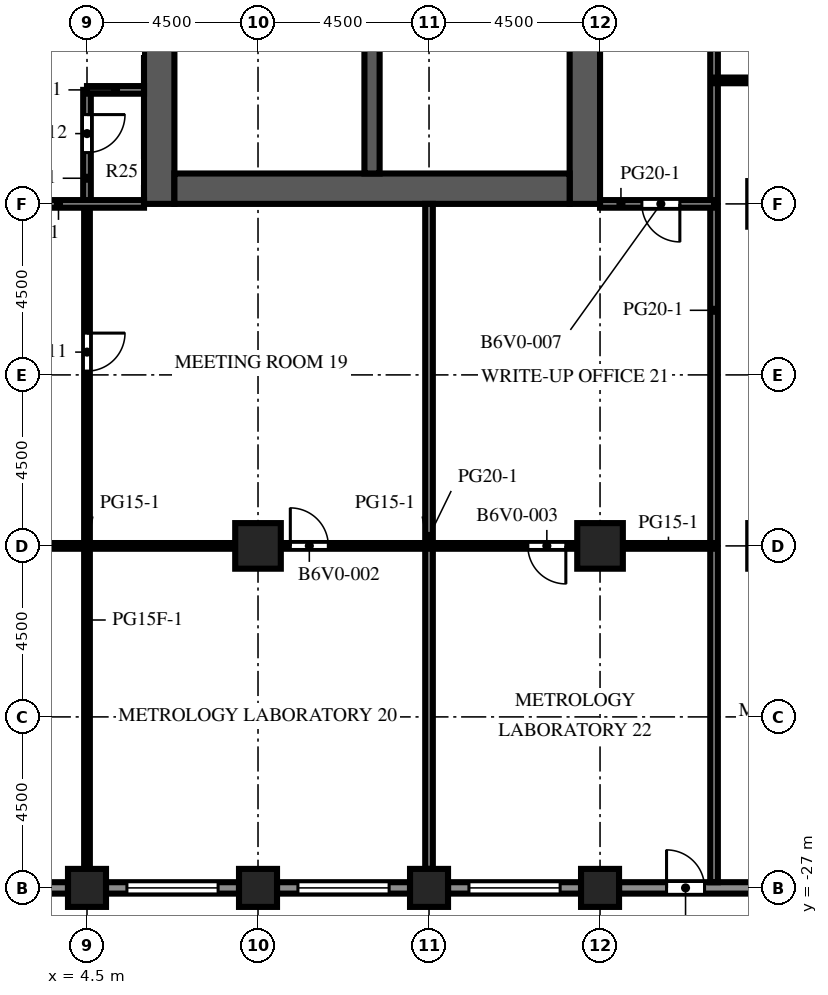
"""IFC4 building model, lengths in metres.
Left out: names, types, materials, properties, quantities, classifications, styles, units other than length and angle.
Written with IfcOpenShell. Run it as: python <this file> out.ifc"""

import sys

from ifc_helpers import new_model, si_unit, direction, frame, frame_2d, origin, origin_2d, place, context, subcontext, project, spatial, rectangle, extrude, element, fill, save


model = new_model("IFC4")
c1 = context("Model", 3, precision=1e-05, world=origin(), true_north=direction((0.0, 1.0)))
c2 = subcontext(c1, "Body", "Model", "MODEL_VIEW")
j1 = project(units=[si_unit("LENGTHUNIT", "METRE"), si_unit("PLANEANGLEUNIT", "RADIAN")], contexts=[c1])
p1 = place(None, origin())
s1 = spatial("IfcSite", under=j1, at=p1, CompositionType="ELEMENT")
p2 = place(p1, origin())
s2 = spatial("IfcBuilding", under=s1, at=p2, CompositionType="ELEMENT")
p3 = place(p2, frame((0.0, 0.0, 199.7)))
s3 = spatial("IfcBuildingStorey", under=s2, at=p3, CompositionType="ELEMENT", Elevation=199.7)
for number, where, z_axis, x_axis in (
    (1, (4.5, -27.0, 0.0), (0.0, 0.0, 1.0), (1.0, 0.0, 0.0)),
    (2, (9.0, -27.0, 0.0), (0.0, 0.0, 1.0), (1.0, 0.0, 0.0)),
    (3, (13.5, -27.0, 0.0), (0.0, 0.0, 1.0), (1.0, 0.0, 0.0)),
    (4, (18.0, -27.0, 0.0), (0.0, 0.0, 1.0), (1.0, 0.0, 0.0)),
):
    element("IfcColumn", number, at=place(p3, frame(where, z_axis=z_axis, x_axis=x_axis)), inside=s3, PredefinedType="COLUMN", context=c2, shape_type="SweptSolid", body=[
        extrude(rectangle(XDim=1.0, YDim=1.0, at=origin_2d()), origin(), (0.0, 0.0, 1.0), 4.1),
    ])
for number, where, z_axis, x_axis in (
    (5, (9.0, -18.0, 0.0), (0.0, 0.0, 1.0), (1.0, 0.0, 0.0)),
    (6, (18.0, -18.0, 0.0), (0.0, 0.0, 1.0), (1.0, 0.0, 0.0)),
):
    element("IfcColumn", number, at=place(p3, frame(where, z_axis=z_axis, x_axis=x_axis)), inside=s3, PredefinedType="COLUMN", context=c2, shape_type="SweptSolid", body=[
        extrude(rectangle(XDim=1.2, YDim=1.2, at=origin_2d()), origin(), (0.0, 0.0, 1.0), 4.1),
    ])
p4 = place(p3, frame((6.4, -9.0, 0.0), z_axis=(0.0, 0.0, 1.0), x_axis=(0.0, 1.0, 0.0)))
e7 = element("IfcWall", 7, at=p4, inside=s3, PredefinedType="SHEAR", context=c2, shape_type="SweptSolid", body=[
    extrude(rectangle(XDim=27.5, YDim=0.8, at=frame_2d((13.75, 0.0))), origin(), (0.0, 0.0, 1.0), 4.1),
])
p5 = place(p4, frame((12.55, 0.0, 0.0)))
e8 = element("IfcOpeningElement", 8, at=p5, cuts=e7, PredefinedType="OPENING", context=c2, shape_type="SweptSolid", body=[
    extrude(rectangle(XDim=2.4, YDim=2.4, at=frame_2d((1.2, 1.2))), frame((0.0, 0.41, 0.0), z_axis=(0.0, -1.0, 0.0), x_axis=(1.0, 0.0, 0.0)), (0.0, 0.0, 1.0), 0.82),
])
p6 = place(p4, frame((3.95, 0.0, 0.0)))
e9 = element("IfcOpeningElement", 9, at=p6, cuts=e7, PredefinedType="OPENING", context=c2, shape_type="SweptSolid", body=[
    extrude(rectangle(XDim=1.2, YDim=2.1, at=frame_2d((0.6, 1.05))), frame((0.0, 0.41, 0.0), z_axis=(0.0, -1.0, 0.0), x_axis=(1.0, 0.0, 0.0)), (0.0, 0.0, 1.0), 0.82),
])
p7 = place(p4, frame((19.45, 0.0, 0.0)))
e10 = element("IfcOpeningElement", 10, at=p7, cuts=e7, PredefinedType="OPENING", context=c2, shape_type="SweptSolid", body=[
    extrude(rectangle(XDim=1.0, YDim=2.1, at=frame_2d((0.5, 1.05))), frame((0.0, 0.41, 0.0), z_axis=(0.0, -1.0, 0.0), x_axis=(1.0, 0.0, 0.0)), (0.0, 0.0, 1.0), 0.82),
])
p8 = place(p4, frame((21.137, 0.0, 0.0)))
e11 = element("IfcOpeningElement", 11, at=p8, cuts=e7, PredefinedType="OPENING", context=c2, shape_type="SweptSolid", body=[
    extrude(rectangle(XDim=1.0, YDim=2.1, at=frame_2d((0.5, 1.05))), frame((0.0, 0.41, 0.0), z_axis=(0.0, -1.0, 0.0), x_axis=(1.0, 0.0, 0.0)), (0.0, 0.0, 1.0), 0.82),
])
p9 = place(p4, frame((23.2, 0.0, 0.0)))
e12 = element("IfcOpeningElement", 12, at=p9, cuts=e7, PredefinedType="OPENING", context=c2, shape_type="SweptSolid", body=[
    extrude(rectangle(XDim=1.0, YDim=2.1, at=frame_2d((0.5, 1.05))), frame((0.0, 0.41, 0.0), z_axis=(0.0, -1.0, 0.0), x_axis=(1.0, 0.0, 0.0)), (0.0, 0.0, 1.0), 0.82),
])
p10 = place(p4, frame((25.262, 0.0, 0.0)))
e13 = element("IfcOpeningElement", 13, at=p10, cuts=e7, PredefinedType="OPENING", context=c2, shape_type="SweptSolid", body=[
    extrude(rectangle(XDim=1.0, YDim=2.1, at=frame_2d((0.5, 1.05))), frame((0.0, 0.41, 0.0), z_axis=(0.0, -1.0, 0.0), x_axis=(1.0, 0.0, 0.0)), (0.0, 0.0, 1.0), 0.82),
])
p11 = place(p3, frame((17.6, -9.0, 0.0), z_axis=(0.0, 0.0, 1.0), x_axis=(0.0, 1.0, 0.0)))
e14 = element("IfcWall", 14, at=p11, inside=s3, PredefinedType="SHEAR", context=c2, shape_type="SweptSolid", body=[
    extrude(rectangle(XDim=27.5, YDim=0.8, at=frame_2d((13.75, 0.0))), origin(), (0.0, 0.0, 1.0), 4.1),
])
p12 = place(p11, frame((12.55, 0.0, 0.0)))
e15 = element("IfcOpeningElement", 15, at=p12, cuts=e14, PredefinedType="OPENING", context=c2, shape_type="SweptSolid", body=[
    extrude(rectangle(XDim=2.4, YDim=2.4, at=frame_2d((1.2, 1.2))), frame((0.0, 0.41, 0.0), z_axis=(0.0, -1.0, 0.0), x_axis=(1.0, 0.0, 0.0)), (0.0, 0.0, 1.0), 0.82),
])
p13 = place(p11, frame((6.825, 0.0, 0.0)))
e16 = element("IfcOpeningElement", 16, at=p13, cuts=e14, PredefinedType="OPENING", context=c2, shape_type="SweptSolid", body=[
    extrude(rectangle(XDim=1.2, YDim=2.1, at=frame_2d((0.6, 1.05))), frame((0.0, 0.41, 0.0), z_axis=(0.0, -1.0, 0.0), x_axis=(1.0, 0.0, 0.0)), (0.0, 0.0, 1.0), 0.82),
])
p14 = place(p11, frame((19.475, 0.0, 0.0)))
e17 = element("IfcOpeningElement", 17, at=p14, cuts=e14, PredefinedType="OPENING", context=c2, shape_type="SweptSolid", body=[
    extrude(rectangle(XDim=1.2, YDim=2.1, at=frame_2d((0.6, 1.05))), frame((0.0, 0.41, 0.0), z_axis=(0.0, -1.0, 0.0), x_axis=(1.0, 0.0, 0.0)), (0.0, 0.0, 1.0), 0.82),
])
p15 = place(p3, frame((6.8, -8.6, 0.0), z_axis=(0.0, 0.0, 1.0), x_axis=(1.0, 0.0, 0.0)))
e18 = element("IfcWall", 18, at=p15, inside=s3, PredefinedType="SHEAR", context=c2, shape_type="SweptSolid", body=[
    extrude(rectangle(XDim=10.4, YDim=0.8, at=frame_2d((5.2, 0.0))), origin(), (0.0, 0.0, 1.0), 4.1),
])
p16 = place(p3, frame((12.0, -8.2, 0.0), z_axis=(0.0, 0.0, 1.0), x_axis=(0.0, 1.0, 0.0)))
e19 = element("IfcWall", 19, at=p16, inside=s3, PredefinedType="SHEAR", context=c2, shape_type="SweptSolid", body=[
    extrude(rectangle(XDim=7.5, YDim=0.4, at=frame_2d((3.75, 0.0))), origin(), (0.0, 0.0, 1.0), 4.1),
])
p17 = place(p3, frame((4.0, -27.0, 0.0), z_axis=(0.0, 0.0, 1.0), x_axis=(-1.0, 0.0, 0.0)))
e20 = element("IfcWall", 20, at=p17, inside=s3, PredefinedType="SOLIDWALL", context=c2, shape_type="SweptSolid", body=[
    extrude(rectangle(XDim=3.5, YDim=0.3, at=frame_2d((1.75, 0.0))), origin(), (0.0, 0.0, 1.0), 2.85),
])
p18 = place(p17, frame((0.55, 0.0, 0.8)))
e21 = element("IfcOpeningElement", 21, at=p18, cuts=e20, PredefinedType="OPENING", context=c2, shape_type="SweptSolid", body=[
    extrude(rectangle(XDim=2.4, YDim=1.7, at=frame_2d((1.2, 0.85))), frame((0.0, 0.16, 0.0), z_axis=(0.0, -1.0, 0.0), x_axis=(1.0, 0.0, 0.0)), (0.0, 0.0, 1.0), 0.32),
])
p19 = place(p3, frame((8.5, -27.0, 0.0), z_axis=(0.0, 0.0, 1.0), x_axis=(-1.0, 0.0, 0.0)))
e22 = element("IfcWall", 22, at=p19, inside=s3, PredefinedType="SOLIDWALL", context=c2, shape_type="SweptSolid", body=[
    extrude(rectangle(XDim=3.5, YDim=0.3, at=frame_2d((1.75, 0.0))), origin(), (0.0, 0.0, 1.0), 2.85),
])
p20 = place(p19, frame((0.55, 0.0, 0.8)))
e23 = element("IfcOpeningElement", 23, at=p20, cuts=e22, PredefinedType="OPENING", context=c2, shape_type="SweptSolid", body=[
    extrude(rectangle(XDim=2.4, YDim=1.7, at=frame_2d((1.2, 0.85))), frame((0.0, 0.16, 0.0), z_axis=(0.0, -1.0, 0.0), x_axis=(1.0, 0.0, 0.0)), (0.0, 0.0, 1.0), 0.32),
])
p21 = place(p3, frame((13.0, -27.0, 0.0), z_axis=(0.0, 0.0, 1.0), x_axis=(-1.0, 0.0, 0.0)))
e24 = element("IfcWall", 24, at=p21, inside=s3, PredefinedType="SOLIDWALL", context=c2, shape_type="SweptSolid", body=[
    extrude(rectangle(XDim=3.5, YDim=0.3, at=frame_2d((1.75, 0.0))), origin(), (0.0, 0.0, 1.0), 2.85),
])
p22 = place(p21, frame((0.55, 0.0, 0.8)))
e25 = element("IfcOpeningElement", 25, at=p22, cuts=e24, PredefinedType="OPENING", context=c2, shape_type="SweptSolid", body=[
    extrude(rectangle(XDim=2.4, YDim=1.7, at=frame_2d((1.2, 0.85))), frame((0.0, 0.16, 0.0), z_axis=(0.0, -1.0, 0.0), x_axis=(1.0, 0.0, 0.0)), (0.0, 0.0, 1.0), 0.32),
])
p23 = place(p3, frame((17.5, -27.0, 0.0), z_axis=(0.0, 0.0, 1.0), x_axis=(-1.0, 0.0, 0.0)))
e26 = element("IfcWall", 26, at=p23, inside=s3, PredefinedType="SOLIDWALL", context=c2, shape_type="SweptSolid", body=[
    extrude(rectangle(XDim=3.5, YDim=0.3, at=frame_2d((1.75, 0.0))), origin(), (0.0, 0.0, 1.0), 2.85),
])
p24 = place(p23, frame((0.55, 0.0, 0.8)))
e27 = element("IfcOpeningElement", 27, at=p24, cuts=e26, PredefinedType="OPENING", context=c2, shape_type="SweptSolid", body=[
    extrude(rectangle(XDim=2.4, YDim=1.7, at=frame_2d((1.2, 0.85))), frame((0.0, 0.16, 0.0), z_axis=(0.0, -1.0, 0.0), x_axis=(1.0, 0.0, 0.0)), (0.0, 0.0, 1.0), 0.32),
])
p25 = place(p3, frame((22.0, -27.0, 0.0), z_axis=(0.0, 0.0, 1.0), x_axis=(-1.0, 0.0, 0.0)))
e28 = element("IfcWall", 28, at=p25, inside=s3, PredefinedType="SOLIDWALL", context=c2, shape_type="SweptSolid", body=[
    extrude(rectangle(XDim=3.5, YDim=0.3, at=frame_2d((1.75, 0.0))), origin(), (0.0, 0.0, 1.0), 2.85),
])
p26 = place(p25, frame((1.25, 0.0, 0.0)))
e29 = element("IfcOpeningElement", 29, at=p26, cuts=e28, PredefinedType="OPENING", context=c2, shape_type="SweptSolid", body=[
    extrude(rectangle(XDim=1.0, YDim=2.2, at=frame_2d((0.5, 1.1))), frame((0.0, 0.16, 0.0), z_axis=(0.0, -1.0, 0.0), x_axis=(1.0, 0.0, 0.0)), (0.0, 0.0, 1.0), 0.32),
])
p27 = place(p3, frame((6.8, -5.95, 0.0), z_axis=(0.0, 0.0, 1.0), x_axis=(1.0, 0.0, 0.0)))
e30 = element("IfcWall", 30, at=p27, inside=s3, PredefinedType="PARTITIONING", context=c2, shape_type="SweptSolid", body=[
    extrude(rectangle(XDim=1.6, YDim=0.1, at=frame_2d((0.8, 0.0))), origin(), (0.0, 0.0, 1.0), 3.65),
])
p28 = place(p27, frame((0.3, 0.0, 0.0)))
e31 = element("IfcOpeningElement", 31, at=p28, cuts=e30, PredefinedType="OPENING", context=c2, shape_type="SweptSolid", body=[
    extrude(rectangle(XDim=1.0, YDim=2.1, at=frame_2d((0.5, 1.05))), frame((0.0, 0.06, 0.0), z_axis=(0.0, -1.0, 0.0), x_axis=(1.0, 0.0, 0.0)), (0.0, 0.0, 1.0), 0.12),
])
p29 = place(p3, frame((8.4, -5.95, 0.0), z_axis=(0.0, 0.0, 1.0), x_axis=(0.0, 1.0, 0.0)))
e32 = element("IfcWall", 32, at=p29, inside=s3, PredefinedType="PARTITIONING", context=c2, shape_type="SweptSolid", body=[
    extrude(rectangle(XDim=3.0, YDim=0.1, at=frame_2d((1.5, 0.0))), origin(), (0.0, 0.0, 1.0), 3.65),
])
p30 = place(p29, frame((1.0, 0.0, 0.0)))
e33 = element("IfcOpeningElement", 33, at=p30, cuts=e32, PredefinedType="OPENING", context=c2, shape_type="SweptSolid", body=[
    extrude(rectangle(XDim=1.0, YDim=2.1, at=frame_2d((0.5, 1.05))), frame((0.0, 0.06, 0.0), z_axis=(0.0, -1.0, 0.0), x_axis=(1.0, 0.0, 0.0)), (0.0, 0.0, 1.0), 0.12),
])
p31 = place(p3, frame((8.4, -5.95, 0.0), z_axis=(0.0, 0.0, 1.0), x_axis=(1.0, 0.0, 0.0)))
e34 = element("IfcWall", 34, at=p31, inside=s3, PredefinedType="PARTITIONING", context=c2, shape_type="SweptSolid", body=[
    extrude(rectangle(XDim=3.4, YDim=0.1, at=frame_2d((1.7, 0.0))), origin(), (0.0, 0.0, 1.0), 3.65),
])
p32 = place(p3, frame((4.5, -9.0, 0.0), z_axis=(0.0, 0.0, 1.0), x_axis=(0.0, -1.0, 0.0)))
e35 = element("IfcWall", 35, at=p32, inside=s3, PredefinedType="PARTITIONING", context=c2, shape_type="SweptSolid", body=[
    extrude(rectangle(XDim=17.5, YDim=0.15, at=frame_2d((8.75, 0.0))), origin(), (0.0, 0.0, 1.0), 3.65),
])
p33 = place(p32, frame((3.4, 0.0, 0.0)))
e36 = element("IfcOpeningElement", 36, at=p33, cuts=e35, PredefinedType="OPENING", context=c2, shape_type="SweptSolid", body=[
    extrude(rectangle(XDim=1.0, YDim=2.1, at=frame_2d((0.5, 1.05))), frame((0.0, 0.085, 0.0), z_axis=(0.0, -1.0, 0.0), x_axis=(1.0, 0.0, 0.0)), (0.0, 0.0, 1.0), 0.17),
])
p34 = place(p3, frame((4.5, -6.0, 0.0), z_axis=(0.0, 0.0, 1.0), x_axis=(0.0, -1.0, 0.0)))
e37 = element("IfcWall", 37, at=p34, inside=s3, PredefinedType="PARTITIONING", context=c2, shape_type="SweptSolid", body=[
    extrude(rectangle(XDim=3.0, YDim=0.2, at=frame_2d((1.5, 0.0))), origin(), (0.0, 0.0, 1.0), 3.65),
])
p35 = place(p34, frame((0.65, 0.0, 0.0)))
e38 = element("IfcOpeningElement", 38, at=p35, cuts=e37, PredefinedType="OPENING", context=c2, shape_type="SweptSolid", body=[
    extrude(rectangle(XDim=1.0, YDim=2.1, at=frame_2d((0.5, 1.05))), frame((0.0, 0.11, 0.0), z_axis=(0.0, -1.0, 0.0), x_axis=(1.0, 0.0, 0.0)), (0.0, 0.0, 1.0), 0.22),
])
p36 = place(p3, frame((13.5, -26.5, 0.0), z_axis=(0.0, 0.0, 1.0), x_axis=(0.0, 1.0, 0.0)))
e39 = element("IfcWall", 39, at=p36, inside=s3, PredefinedType="PARTITIONING", context=c2, shape_type="SweptSolid", body=[
    extrude(rectangle(XDim=17.5, YDim=0.2, at=frame_2d((8.75, 0.0))), origin(), (0.0, 0.0, 1.0), 3.65),
])
p37 = place(p3, frame((21.0, -26.85, 0.0), z_axis=(0.0, 0.0, 1.0), x_axis=(0.0, 1.0, 0.0)))
e40 = element("IfcWall", 40, at=p37, inside=s3, PredefinedType="PARTITIONING", context=c2, shape_type="SweptSolid", body=[
    extrude(rectangle(XDim=30.1, YDim=0.2, at=frame_2d((15.05, 0.0))), origin(), (0.0, 0.0, 1.0), 3.65),
])
p38 = place(p3, frame((0.6, -18.0, 0.0), z_axis=(0.0, 0.0, 1.0), x_axis=(1.0, 0.0, 0.0)))
e41 = element("IfcWall", 41, at=p38, inside=s3, PredefinedType="PARTITIONING", context=c2, shape_type="SweptSolid", body=[
    extrude(rectangle(XDim=7.8, YDim=0.15, at=frame_2d((3.9, 0.0))), origin(), (0.0, 0.0, 1.0), 3.65),
])
p39 = place(p3, frame((17.4, -18.0, 0.0), z_axis=(0.0, 0.0, 1.0), x_axis=(-1.0, 0.0, 0.0)))
e42 = element("IfcWall", 42, at=p39, inside=s3, PredefinedType="PARTITIONING", context=c2, shape_type="SweptSolid", body=[
    extrude(rectangle(XDim=7.8, YDim=0.15, at=frame_2d((3.9, 0.0))), origin(), (0.0, 0.0, 1.0), 3.65),
])
p40 = place(p39, frame((6.55, 0.0, 0.0)))
e43 = element("IfcOpeningElement", 43, at=p40, cuts=e42, PredefinedType="OPENING", context=c2, shape_type="SweptSolid", body=[
    extrude(rectangle(XDim=1.0, YDim=2.1, at=frame_2d((0.5, 1.05))), frame((0.0, 0.085, 0.0), z_axis=(0.0, -1.0, 0.0), x_axis=(1.0, 0.0, 0.0)), (0.0, 0.0, 1.0), 0.17),
])
p41 = place(p39, frame((0.3, 0.0, 0.0)))
e44 = element("IfcOpeningElement", 44, at=p41, cuts=e42, PredefinedType="OPENING", context=c2, shape_type="SweptSolid", body=[
    extrude(rectangle(XDim=1.0, YDim=2.1, at=frame_2d((0.5, 1.05))), frame((0.0, 0.085, 0.0), z_axis=(0.0, -1.0, 0.0), x_axis=(1.0, 0.0, 0.0)), (0.0, 0.0, 1.0), 0.17),
])
p42 = place(p3, frame((18.6, -18.0, 0.0), z_axis=(0.0, 0.0, 1.0), x_axis=(1.0, 0.0, 0.0)))
e45 = element("IfcWall", 45, at=p42, inside=s3, PredefinedType="PARTITIONING", context=c2, shape_type="SweptSolid", body=[
    extrude(rectangle(XDim=2.4, YDim=0.15, at=frame_2d((1.2, 0.0))), origin(), (0.0, 0.0, 1.0), 3.65),
])
p43 = place(p3, frame((1.5, -9.0, 0.0), z_axis=(0.0, 0.0, 1.0), x_axis=(1.0, 0.0, 0.0)))
e46 = element("IfcWall", 46, at=p43, inside=s3, PredefinedType="PARTITIONING", context=c2, shape_type="SweptSolid", body=[
    extrude(rectangle(XDim=4.5, YDim=0.2, at=frame_2d((2.25, 0.0))), origin(), (0.0, 0.0, 1.0), 3.65),
])
p44 = place(p3, frame((21.0, -9.0, 0.0), z_axis=(0.0, 0.0, 1.0), x_axis=(-1.0, 0.0, 0.0)))
e47 = element("IfcWall", 47, at=p44, inside=s3, PredefinedType="PARTITIONING", context=c2, shape_type="SweptSolid", body=[
    extrude(rectangle(XDim=3.0, YDim=0.2, at=frame_2d((1.5, 0.0))), origin(), (0.0, 0.0, 1.0), 3.65),
])
p45 = place(p44, frame((0.9, 0.0, 0.0)))
e48 = element("IfcOpeningElement", 48, at=p45, cuts=e47, PredefinedType="OPENING", context=c2, shape_type="SweptSolid", body=[
    extrude(rectangle(XDim=1.0, YDim=2.1, at=frame_2d((0.5, 1.05))), frame((0.0, 0.11, 0.0), z_axis=(0.0, -1.0, 0.0), x_axis=(1.0, 0.0, 0.0)), (0.0, 0.0, 1.0), 0.22),
])
p46 = place(p3, frame((4.5, -6.0, 0.0), z_axis=(0.0, 0.0, 1.0), x_axis=(1.0, 0.0, 0.0)))
e49 = element("IfcWall", 49, at=p46, inside=s3, PredefinedType="PARTITIONING", context=c2, shape_type="SweptSolid", body=[
    extrude(rectangle(XDim=1.5, YDim=0.2, at=frame_2d((0.75, 0.0))), origin(), (0.0, 0.0, 1.0), 3.65),
])
p47 = place(p3, frame((31.35, -5.75, 0.0), z_axis=(0.0, 0.0, 1.0), x_axis=(-1.0, 0.0, 0.0)))
e50 = element("IfcWall", 50, at=p47, inside=s3, PredefinedType="PARTITIONING", context=c2, shape_type="SweptSolid", body=[
    extrude(rectangle(XDim=10.35, YDim=0.15, at=frame_2d((5.175, 0.0))), origin(), (0.0, 0.0, 1.0), 3.65),
])
p48 = place(p47, frame((4.75, 0.0, 0.0)))
e51 = element("IfcOpeningElement", 51, at=p48, cuts=e50, PredefinedType="OPENING", context=c2, shape_type="SweptSolid", body=[
    extrude(rectangle(XDim=1.0, YDim=2.1, at=frame_2d((0.5, 1.05))), frame((0.0, 0.085, 0.0), z_axis=(0.0, -1.0, 0.0), x_axis=(1.0, 0.0, 0.0)), (0.0, 0.0, 1.0), 0.17),
])
p49 = place(p20, origin())
e52 = element("IfcWindow", 52, at=p49, inside=s3, PartitioningType="SINGLE_PANEL", PredefinedType="WINDOW", context=c2, shape_type="SweptSolid", body=[
    extrude(rectangle(XDim=2.4, YDim=1.7, at=frame_2d((1.2, 0.85))), frame((0.0, 0.03, 0.0), z_axis=(0.0, -1.0, 0.0), x_axis=(1.0, 0.0, 0.0)), (0.0, 0.0, 1.0), 0.06),
])
fill(e23, e52)
p50 = place(p22, origin())
e53 = element("IfcWindow", 53, at=p50, inside=s3, PartitioningType="SINGLE_PANEL", PredefinedType="WINDOW", context=c2, shape_type="SweptSolid", body=[
    extrude(rectangle(XDim=2.4, YDim=1.7, at=frame_2d((1.2, 0.85))), frame((0.0, 0.03, 0.0), z_axis=(0.0, -1.0, 0.0), x_axis=(1.0, 0.0, 0.0)), (0.0, 0.0, 1.0), 0.06),
])
fill(e25, e53)
p51 = place(p24, origin())
e54 = element("IfcWindow", 54, at=p51, inside=s3, PartitioningType="SINGLE_PANEL", PredefinedType="WINDOW", context=c2, shape_type="SweptSolid", body=[
    extrude(rectangle(XDim=2.4, YDim=1.7, at=frame_2d((1.2, 0.85))), frame((0.0, 0.03, 0.0), z_axis=(0.0, -1.0, 0.0), x_axis=(1.0, 0.0, 0.0)), (0.0, 0.0, 1.0), 0.06),
])
fill(e27, e54)
p52 = place(p26, origin())
e55 = element("IfcDoor", 55, at=p52, inside=s3, OperationType="SINGLE_SWING_RIGHT", PredefinedType="DOOR", context=c2, shape_type="SweptSolid", body=[
    extrude(rectangle(XDim=1.0, YDim=2.2, at=frame_2d((0.5, 1.1))), frame((0.0, 0.025, 0.0), z_axis=(0.0, -1.0, 0.0), x_axis=(1.0, 0.0, 0.0)), (0.0, 0.0, 1.0), 0.05),
])
fill(e29, e55)
p53 = place(p6, origin())
e56 = element("IfcDoor", 56, at=p53, inside=s3, OperationType="SINGLE_SWING_RIGHT", PredefinedType="DOOR", context=c2, shape_type="SweptSolid", body=[
    extrude(rectangle(XDim=1.2, YDim=2.1, at=frame_2d((0.6, 1.05))), frame((0.0, -0.325, 0.0), z_axis=(0.0, -1.0, 0.0), x_axis=(1.0, 0.0, 0.0)), (0.0, 0.0, 1.0), 0.05),
])
fill(e9, e56)
p54 = place(p28, origin())
e57 = element("IfcDoor", 57, at=p54, inside=s3, OperationType="SINGLE_SWING_LEFT", PredefinedType="DOOR", context=c2, shape_type="SweptSolid", body=[
    extrude(rectangle(XDim=1.0, YDim=2.1, at=frame_2d((0.5, 1.05))), frame((0.0, 0.025, 0.0), z_axis=(0.0, -1.0, 0.0), x_axis=(1.0, 0.0, 0.0)), (0.0, 0.0, 1.0), 0.05),
])
fill(e31, e57)
p55 = place(p40, origin())
e58 = element("IfcDoor", 58, at=p55, inside=s3, OperationType="SINGLE_SWING_RIGHT", PredefinedType="DOOR", context=c2, shape_type="SweptSolid", body=[
    extrude(rectangle(XDim=1.0, YDim=2.1, at=frame_2d((0.5, 1.05))), frame((0.0, 0.025, 0.0), z_axis=(0.0, -1.0, 0.0), x_axis=(1.0, 0.0, 0.0)), (0.0, 0.0, 1.0), 0.05),
])
fill(e43, e58)
p56 = place(p41, origin())
e59 = element("IfcDoor", 59, at=p56, inside=s3, OperationType="SINGLE_SWING_LEFT", PredefinedType="DOOR", context=c2, shape_type="SweptSolid", body=[
    extrude(rectangle(XDim=1.0, YDim=2.1, at=frame_2d((0.5, 1.05))), frame((0.0, 0.025, 0.0), z_axis=(0.0, -1.0, 0.0), x_axis=(1.0, 0.0, 0.0)), (0.0, 0.0, 1.0), 0.05),
])
fill(e44, e59)
p57 = place(p45, origin())
e60 = element("IfcDoor", 60, at=p57, inside=s3, OperationType="SINGLE_SWING_LEFT", PredefinedType="DOOR", context=c2, shape_type="SweptSolid", body=[
    extrude(rectangle(XDim=1.0, YDim=2.1, at=frame_2d((0.5, 1.05))), frame((0.0, 0.025, 0.0), z_axis=(0.0, -1.0, 0.0), x_axis=(1.0, 0.0, 0.0)), (0.0, 0.0, 1.0), 0.05),
])
fill(e48, e60)
p58 = place(p33, origin())
e61 = element("IfcDoor", 61, at=p58, inside=s3, OperationType="SINGLE_SWING_LEFT", PredefinedType="DOOR", context=c2, shape_type="SweptSolid", body=[
    extrude(rectangle(XDim=1.0, YDim=2.1, at=frame_2d((0.5, 1.05))), frame((0.0, 0.025, 0.0), z_axis=(0.0, -1.0, 0.0), x_axis=(1.0, 0.0, 0.0)), (0.0, 0.0, 1.0), 0.05),
])
fill(e36, e61)
p59 = place(p35, origin())
e62 = element("IfcDoor", 62, at=p59, inside=s3, OperationType="SINGLE_SWING_LEFT", PredefinedType="DOOR", context=c2, shape_type="SweptSolid", body=[
    extrude(rectangle(XDim=1.0, YDim=2.1, at=frame_2d((0.5, 1.05))), frame((0.0, 0.025, 0.0), z_axis=(0.0, -1.0, 0.0), x_axis=(1.0, 0.0, 0.0)), (0.0, 0.0, 1.0), 0.05),
])
fill(e38, e62)
save(model, sys.argv[1])
